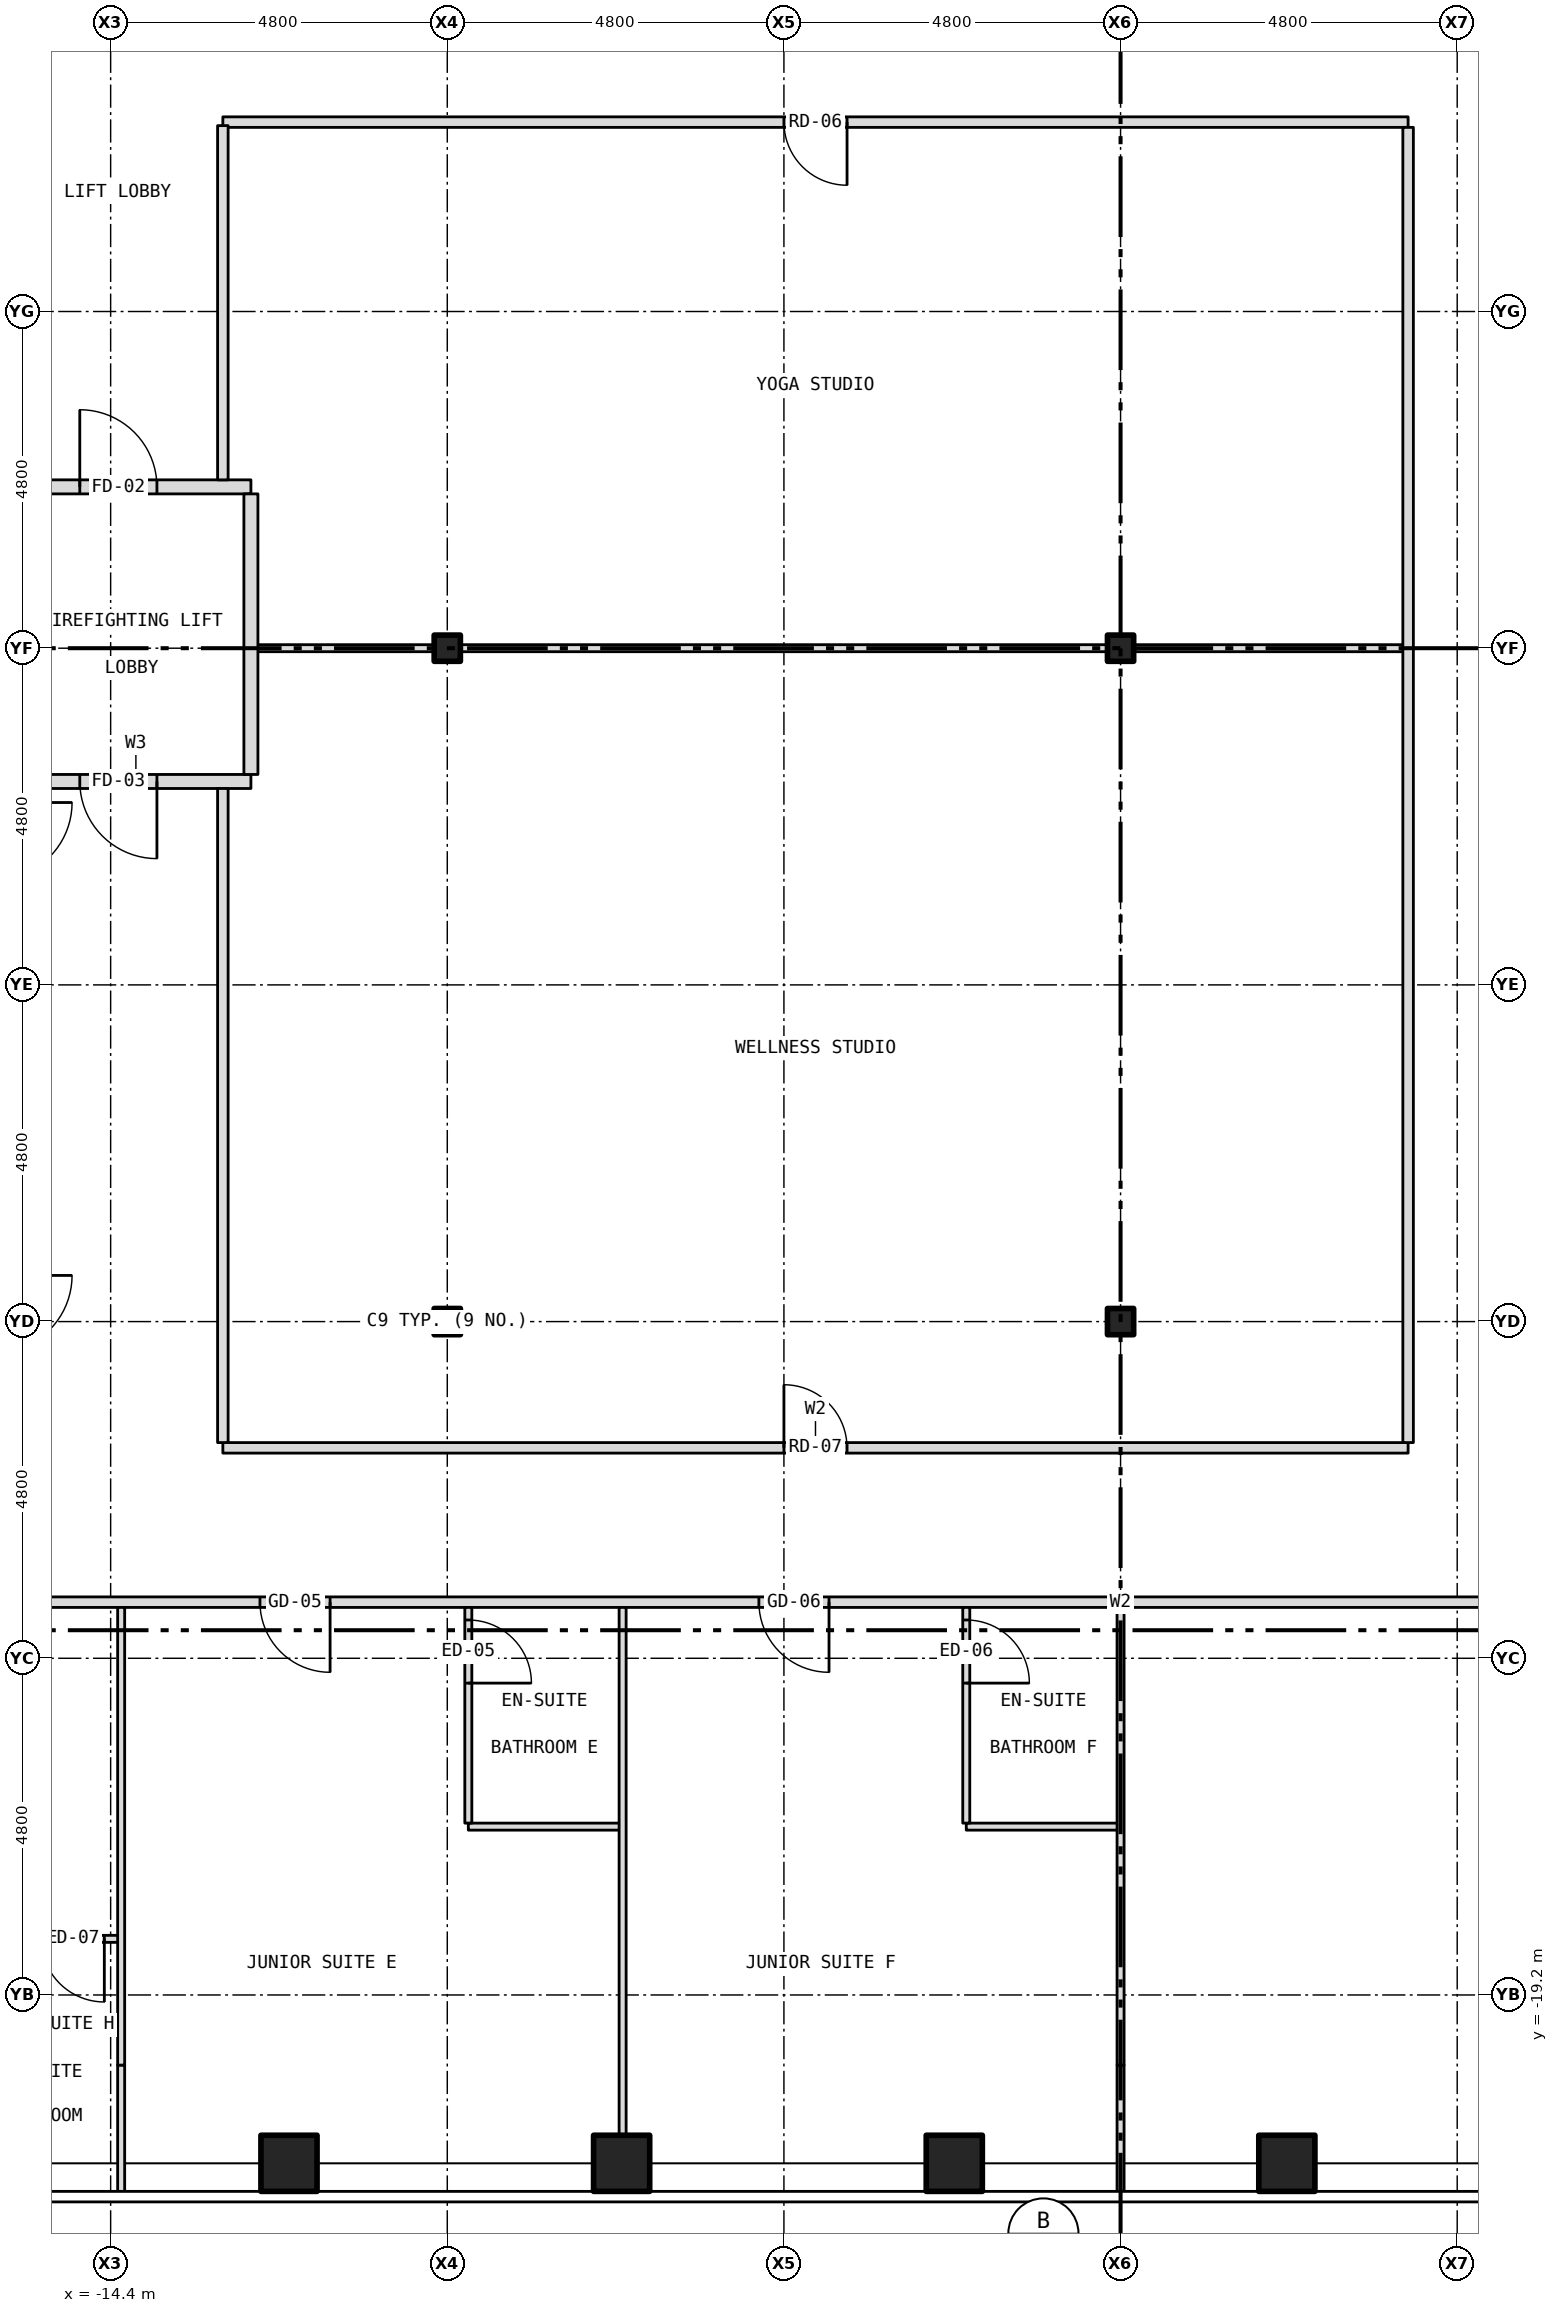
"""IFC4 building model, lengths in metres.
Left out: names, types, materials, properties, quantities, classifications, styles, units other than length and angle.
Written with IfcOpenShell. Run it as: python <this file> out.ifc"""

import sys

from ifc_helpers import new_model, si_unit, direction, frame, frame_2d, origin, origin_2d, place, context, subcontext, project, spatial, rectangle, hollow_rectangle, i_section, extrude, element, fill, save


model = new_model("IFC4")
c1 = context("Model", 3, precision=1e-05, world=origin(), true_north=direction((0.0, 1.0)))
c2 = subcontext(c1, "Body", "Model", "MODEL_VIEW")
j1 = project(units=[si_unit("LENGTHUNIT", "METRE"), si_unit("PLANEANGLEUNIT", "RADIAN")], contexts=[c1])
p1 = place(None, origin())
s1 = spatial("IfcSite", under=j1, at=p1, CompositionType="ELEMENT")
p2 = place(p1, origin())
s2 = spatial("IfcBuilding", under=s1, at=p2, CompositionType="ELEMENT")
p3 = place(p2, frame((0.0, 0.0, 183.0)))
s3 = spatial("IfcBuildingStorey", under=s2, at=p3, CompositionType="ELEMENT", Elevation=183.0)
for number, where, z_axis, x_axis in (
    (1, (-11.857, -21.6, -0.15), (0.0, 0.0, 1.0), (1.0, 0.0, 0.0)),
    (2, (-7.114, -21.6, -0.15), (0.0, 0.0, 1.0), (1.0, 0.0, 0.0)),
    (3, (-2.371, -21.6, -0.15), (0.0, 0.0, 1.0), (1.0, 0.0, 0.0)),
    (4, (2.371, -21.6, -0.15), (0.0, 0.0, 1.0), (1.0, 0.0, 0.0)),
):
    element("IfcColumn", number, at=place(p3, frame(where, z_axis=z_axis, x_axis=x_axis)), inside=s3, PredefinedType="COLUMN", context=c2, shape_type="SweptSolid", body=[
        extrude(hollow_rectangle(XDim=0.8, YDim=0.8, WallThickness=0.045, at=origin_2d()), origin(), (0.0, 0.0, 1.0), 3.35),
    ])
for number, where, z_axis, x_axis in (
    (5, (-9.6, -9.6, -0.15), (0.0, 0.0, 1.0), (1.0, 0.0, 0.0)),
    (6, (-9.6, 0.0, -0.15), (0.0, 0.0, 1.0), (1.0, 0.0, 0.0)),
    (7, (0.0, -9.6, -0.15), (0.0, 0.0, 1.0), (1.0, 0.0, 0.0)),
    (8, (0.0, 0.0, -0.15), (0.0, 0.0, 1.0), (1.0, 0.0, 0.0)),
):
    element("IfcColumn", number, at=place(p3, frame(where, z_axis=z_axis, x_axis=x_axis)), inside=s3, PredefinedType="COLUMN", context=c2, shape_type="SweptSolid", body=[
        extrude(i_section(OverallWidth=0.373, OverallDepth=0.373, WebThickness=0.016, FlangeThickness=0.026, at=origin_2d()), origin(), (0.0, 0.0, 1.0), 3.35),
    ])
p4 = place(p3, frame((-17.03, -18.4, 0.0), z_axis=(0.0, 0.0, 1.0), x_axis=(1.0, 0.0, 0.0)))
e9 = element("IfcWall", 9, at=p4, inside=s3, PredefinedType="PARTITIONING", context=c2, shape_type="SweptSolid", body=[
    extrude(rectangle(XDim=2.78, YDim=0.1, at=frame_2d((1.39, 0.0))), origin(), (0.0, 0.0, 1.0), 3.2),
])
p5 = place(p4, frame((1.64, 0.0, 0.0)))
e10 = element("IfcOpeningElement", 10, at=p5, cuts=e9, PredefinedType="OPENING", context=c2, shape_type="SweptSolid", body=[
    extrude(rectangle(XDim=0.9, YDim=2.1, at=frame_2d((0.45, 1.05))), frame((0.0, 0.062, 0.0), z_axis=(0.0, -1.0, 0.0), x_axis=(1.0, 0.0, 0.0)), (0.0, 0.0, 1.0), 0.124),
])
for number, where, z_axis, x_axis in (
    (11, (-9.3, -16.8, 0.0), (0.0, 0.0, 1.0), (1.0, 0.0, 0.0)),
    (12, (-2.2, -16.8, 0.0), (0.0, 0.0, 1.0), (1.0, 0.0, 0.0)),
):
    element("IfcWall", number, at=place(p3, frame(where, z_axis=z_axis, x_axis=x_axis)), inside=s3, PredefinedType="PARTITIONING", context=c2, shape_type="SweptSolid", body=[
        extrude(rectangle(XDim=2.2, YDim=0.1, at=frame_2d((1.1, 0.0))), origin(), (0.0, 0.0, 1.0), 3.2),
    ])
p6 = place(p3, frame((-15.8, -13.6, 0.0), z_axis=(0.0, 0.0, 1.0), x_axis=(1.0, 0.0, 0.0)))
e13 = element("IfcWall", 13, at=p6, inside=s3, PredefinedType="PARTITIONING", context=c2, shape_type="SweptSolid", body=[
    extrude(rectangle(XDim=31.6, YDim=0.15, at=frame_2d((15.8, 0.0))), origin(), (0.0, 0.0, 1.0), 3.2),
])
p7 = place(p6, frame((3.529, 0.0, 0.0)))
e14 = element("IfcOpeningElement", 14, at=p7, cuts=e13, PredefinedType="OPENING", context=c2, shape_type="SweptSolid", body=[
    extrude(rectangle(XDim=1.0, YDim=2.1, at=frame_2d((0.5, 1.05))), frame((0.0, 0.087, 0.0), z_axis=(0.0, -1.0, 0.0), x_axis=(1.0, 0.0, 0.0)), (0.0, 0.0, 1.0), 0.174),
])
p8 = place(p6, frame((10.643, 0.0, 0.0)))
e15 = element("IfcOpeningElement", 15, at=p8, cuts=e13, PredefinedType="OPENING", context=c2, shape_type="SweptSolid", body=[
    extrude(rectangle(XDim=1.0, YDim=2.1, at=frame_2d((0.5, 1.05))), frame((0.0, 0.087, 0.0), z_axis=(0.0, -1.0, 0.0), x_axis=(1.0, 0.0, 0.0)), (0.0, 0.0, 1.0), 0.174),
])
p9 = place(p6, frame((22.465, 0.0, 0.0)))
e16 = element("IfcOpeningElement", 16, at=p9, cuts=e13, PredefinedType="OPENING", context=c2, shape_type="SweptSolid", body=[
    extrude(rectangle(XDim=0.9, YDim=2.1, at=frame_2d((0.45, 1.05))), frame((0.0, 0.087, 0.0), z_axis=(0.0, -1.0, 0.0), x_axis=(1.0, 0.0, 0.0)), (0.0, 0.0, 1.0), 0.174),
])
p10 = place(p3, frame((-12.8, -11.4, 0.0), z_axis=(0.0, 0.0, 1.0), x_axis=(1.0, 0.0, 0.0)))
e17 = element("IfcWall", 17, at=p10, inside=s3, PredefinedType="PARTITIONING", context=c2, shape_type="SweptSolid", body=[
    extrude(rectangle(XDim=16.9, YDim=0.15, at=frame_2d((8.45, 0.0))), origin(), (0.0, 0.0, 1.0), 3.2),
])
p11 = place(p10, frame((8.0, 0.0, 0.0)))
e18 = element("IfcOpeningElement", 18, at=p11, cuts=e17, PredefinedType="OPENING", context=c2, shape_type="SweptSolid", body=[
    extrude(rectangle(XDim=0.9, YDim=2.1, at=frame_2d((0.45, 1.05))), frame((0.0, 0.087, 0.0), z_axis=(0.0, -1.0, 0.0), x_axis=(1.0, 0.0, 0.0)), (0.0, 0.0, 1.0), 0.174),
])
p12 = place(p3, frame((-15.68, -1.9, 0.0), z_axis=(0.0, 0.0, 1.0), x_axis=(1.0, 0.0, 0.0)))
e19 = element("IfcWall", 19, at=p12, inside=s3, PredefinedType="PARTITIONING", context=c2, shape_type="SweptSolid", body=[
    extrude(rectangle(XDim=3.28, YDim=0.2, at=frame_2d((1.64, 0.0))), origin(), (0.0, 0.0, 1.0), 3.2),
])
p13 = place(p12, frame((0.84, 0.0, 0.0)))
e20 = element("IfcOpeningElement", 20, at=p13, cuts=e19, PredefinedType="OPENING", context=c2, shape_type="SweptSolid", body=[
    extrude(rectangle(XDim=1.1, YDim=2.1, at=frame_2d((0.55, 1.05))), frame((0.0, 0.112, 0.0), z_axis=(0.0, -1.0, 0.0), x_axis=(1.0, 0.0, 0.0)), (0.0, 0.0, 1.0), 0.224),
])
p14 = place(p3, frame((-12.4, 0.0, 0.0), z_axis=(0.0, 0.0, 1.0), x_axis=(1.0, 0.0, 0.0)))
e21 = element("IfcWall", 21, at=p14, inside=s3, PredefinedType="PARTITIONING", context=c2, shape_type="SweptSolid", body=[
    extrude(rectangle(XDim=2.613, YDim=0.1, at=frame_2d((1.306, 0.0))), origin(), (0.0, 0.0, 1.0), 2.578),
])
p15 = place(p3, frame((-9.787, 0.0, 0.0), z_axis=(0.0, 0.0, 1.0), x_axis=(1.0, 0.0, 0.0)))
e22 = element("IfcWall", 22, at=p15, inside=s3, PredefinedType="PARTITIONING", context=c2, shape_type="SweptSolid", body=[
    extrude(rectangle(XDim=0.374, YDim=0.1, at=frame_2d((0.187, 0.0))), origin(), (0.0, 0.0, 1.0), 3.2),
])
p16 = place(p3, frame((-9.413, 0.0, 0.0), z_axis=(0.0, 0.0, 1.0), x_axis=(1.0, 0.0, 0.0)))
e23 = element("IfcWall", 23, at=p16, inside=s3, PredefinedType="PARTITIONING", context=c2, shape_type="SweptSolid", body=[
    extrude(rectangle(XDim=9.226, YDim=0.1, at=frame_2d((4.613, 0.0))), origin(), (0.0, 0.0, 1.0), 2.578),
])
p17 = place(p3, frame((-0.187, 0.0, 0.0), z_axis=(0.0, 0.0, 1.0), x_axis=(1.0, 0.0, 0.0)))
e24 = element("IfcWall", 24, at=p17, inside=s3, PredefinedType="PARTITIONING", context=c2, shape_type="SweptSolid", body=[
    extrude(rectangle(XDim=0.374, YDim=0.1, at=frame_2d((0.187, 0.0))), origin(), (0.0, 0.0, 1.0), 3.2),
])
p18 = place(p3, frame((0.187, 0.0, 0.0), z_axis=(0.0, 0.0, 1.0), x_axis=(1.0, 0.0, 0.0)))
e25 = element("IfcWall", 25, at=p18, inside=s3, PredefinedType="PARTITIONING", context=c2, shape_type="SweptSolid", body=[
    extrude(rectangle(XDim=3.913, YDim=0.1, at=frame_2d((1.957, 0.0))), origin(), (0.0, 0.0, 1.0), 2.578),
])
p19 = place(p3, frame((-15.68, 2.3, 0.0), z_axis=(0.0, 0.0, 1.0), x_axis=(1.0, 0.0, 0.0)))
e26 = element("IfcWall", 26, at=p19, inside=s3, PredefinedType="PARTITIONING", context=c2, shape_type="SweptSolid", body=[
    extrude(rectangle(XDim=3.28, YDim=0.2, at=frame_2d((1.64, 0.0))), origin(), (0.0, 0.0, 1.0), 3.2),
])
p20 = place(p19, frame((0.84, 0.0, 0.0)))
e27 = element("IfcOpeningElement", 27, at=p20, cuts=e26, PredefinedType="OPENING", context=c2, shape_type="SweptSolid", body=[
    extrude(rectangle(XDim=1.1, YDim=2.1, at=frame_2d((0.55, 1.05))), frame((0.0, 0.112, 0.0), z_axis=(0.0, -1.0, 0.0), x_axis=(1.0, 0.0, 0.0)), (0.0, 0.0, 1.0), 0.224),
])
p21 = place(p3, frame((-12.8, 7.5, 0.0), z_axis=(0.0, 0.0, 1.0), x_axis=(1.0, 0.0, 0.0)))
e28 = element("IfcWall", 28, at=p21, inside=s3, PredefinedType="PARTITIONING", context=c2, shape_type="SweptSolid", body=[
    extrude(rectangle(XDim=16.9, YDim=0.15, at=frame_2d((8.45, 0.0))), origin(), (0.0, 0.0, 1.0), 3.2),
])
p22 = place(p21, frame((8.0, 0.0, 0.0)))
e29 = element("IfcOpeningElement", 29, at=p22, cuts=e28, PredefinedType="OPENING", context=c2, shape_type="SweptSolid", body=[
    extrude(rectangle(XDim=0.9, YDim=2.1, at=frame_2d((0.45, 1.05))), frame((0.0, 0.087, 0.0), z_axis=(0.0, -1.0, 0.0), x_axis=(1.0, 0.0, 0.0)), (0.0, 0.0, 1.0), 0.174),
])
p23 = place(p3, frame((-14.25, -22.03, 0.0), z_axis=(0.0, 0.0, 1.0), x_axis=(0.0, 1.0, 0.0)))
e30 = element("IfcWall", 30, at=p23, inside=s3, PredefinedType="PARTITIONING", context=c2, shape_type="SweptSolid", body=[
    extrude(rectangle(XDim=1.831, YDim=0.1, at=frame_2d((0.915, 0.0))), origin(), (0.0, 0.0, 1.0), 3.2),
])
p24 = place(p3, frame((-14.25, -20.2, 0.0), z_axis=(0.0, 0.0, 1.0), x_axis=(0.0, 1.0, 0.0)))
e31 = element("IfcWall", 31, at=p24, inside=s3, PredefinedType="PARTITIONING", context=c2, shape_type="SweptSolid", body=[
    extrude(rectangle(XDim=6.525, YDim=0.1, at=frame_2d((3.262, 0.0))), origin(), (0.0, 0.0, 1.0), 2.667),
])
p25 = place(p3, frame((-12.8, -11.325, 0.0), z_axis=(0.0, 0.0, 1.0), x_axis=(0.0, 1.0, 0.0)))
e32 = element("IfcWall", 32, at=p25, inside=s3, PredefinedType="PARTITIONING", context=c2, shape_type="SweptSolid", body=[
    extrude(rectangle(XDim=9.325, YDim=0.15, at=frame_2d((4.663, 0.0))), origin(), (0.0, 0.0, 1.0), 3.2),
])
p26 = place(p3, frame((-12.8, 2.4, 0.0), z_axis=(0.0, 0.0, 1.0), x_axis=(0.0, 1.0, 0.0)))
e33 = element("IfcWall", 33, at=p26, inside=s3, PredefinedType="PARTITIONING", context=c2, shape_type="SweptSolid", body=[
    extrude(rectangle(XDim=5.05, YDim=0.15, at=frame_2d((2.525, 0.0))), origin(), (0.0, 0.0, 1.0), 3.2),
])
p27 = place(p3, frame((-12.4, -1.8, 0.0), z_axis=(0.0, 0.0, 1.0), x_axis=(0.0, 1.0, 0.0)))
e34 = element("IfcWall", 34, at=p27, inside=s3, PredefinedType="PARTITIONING", context=c2, shape_type="SweptSolid", body=[
    extrude(rectangle(XDim=4.0, YDim=0.2, at=frame_2d((2.0, 0.0))), origin(), (0.0, 0.0, 1.0), 3.2),
])
p28 = place(p3, frame((-9.3, -16.75, 0.0), z_axis=(0.0, 0.0, 1.0), x_axis=(0.0, 1.0, 0.0)))
e35 = element("IfcWall", 35, at=p28, inside=s3, PredefinedType="PARTITIONING", context=c2, shape_type="SweptSolid", body=[
    extrude(rectangle(XDim=3.075, YDim=0.1, at=frame_2d((1.538, 0.0))), origin(), (0.0, 0.0, 1.0), 3.2),
])
p29 = place(p28, frame((1.996, 0.0, 0.0)))
e36 = element("IfcOpeningElement", 36, at=p29, cuts=e35, PredefinedType="OPENING", context=c2, shape_type="SweptSolid", body=[
    extrude(rectangle(XDim=0.9, YDim=2.1, at=frame_2d((0.45, 1.05))), frame((0.0, 0.062, 0.0), z_axis=(0.0, -1.0, 0.0), x_axis=(1.0, 0.0, 0.0)), (0.0, 0.0, 1.0), 0.124),
])
p30 = place(p3, frame((-7.1, -21.48, 0.0), z_axis=(0.0, 0.0, 1.0), x_axis=(0.0, 1.0, 0.0)))
e37 = element("IfcWall", 37, at=p30, inside=s3, PredefinedType="PARTITIONING", context=c2, shape_type="SweptSolid", body=[
    extrude(rectangle(XDim=7.805, YDim=0.1, at=frame_2d((3.902, 0.0))), origin(), (0.0, 0.0, 1.0), 3.2),
])
p31 = place(p3, frame((-2.2, -16.75, 0.0), z_axis=(0.0, 0.0, 1.0), x_axis=(0.0, 1.0, 0.0)))
e38 = element("IfcWall", 38, at=p31, inside=s3, PredefinedType="PARTITIONING", context=c2, shape_type="SweptSolid", body=[
    extrude(rectangle(XDim=3.075, YDim=0.1, at=frame_2d((1.538, 0.0))), origin(), (0.0, 0.0, 1.0), 3.2),
])
p32 = place(p31, frame((1.996, 0.0, 0.0)))
e39 = element("IfcOpeningElement", 39, at=p32, cuts=e38, PredefinedType="OPENING", context=c2, shape_type="SweptSolid", body=[
    extrude(rectangle(XDim=0.9, YDim=2.1, at=frame_2d((0.45, 1.05))), frame((0.0, 0.062, 0.0), z_axis=(0.0, -1.0, 0.0), x_axis=(1.0, 0.0, 0.0)), (0.0, 0.0, 1.0), 0.124),
])
p33 = place(p3, frame((0.0, -22.03, 0.0), z_axis=(0.0, 0.0, 1.0), x_axis=(0.0, 1.0, 0.0)))
e40 = element("IfcWall", 40, at=p33, inside=s3, PredefinedType="PARTITIONING", context=c2, shape_type="SweptSolid", body=[
    extrude(rectangle(XDim=1.831, YDim=0.1, at=frame_2d((0.915, 0.0))), origin(), (0.0, 0.0, 1.0), 3.2),
])
p34 = place(p3, frame((0.0, -20.2, 0.0), z_axis=(0.0, 0.0, 1.0), x_axis=(0.0, 1.0, 0.0)))
e41 = element("IfcWall", 41, at=p34, inside=s3, PredefinedType="PARTITIONING", context=c2, shape_type="SweptSolid", body=[
    extrude(rectangle(XDim=6.525, YDim=0.1, at=frame_2d((3.262, 0.0))), origin(), (0.0, 0.0, 1.0), 2.578),
])
p35 = place(p3, frame((4.1, -11.325, 0.0), z_axis=(0.0, 0.0, 1.0), x_axis=(0.0, 1.0, 0.0)))
e42 = element("IfcWall", 42, at=p35, inside=s3, PredefinedType="PARTITIONING", context=c2, shape_type="SweptSolid", body=[
    extrude(rectangle(XDim=18.75, YDim=0.15, at=frame_2d((9.375, 0.0))), origin(), (0.0, 0.0, 1.0), 3.2),
])
p36 = place(p20, origin())
e43 = element("IfcDoor", 43, at=p36, inside=s3, OperationType="SINGLE_SWING_LEFT", PredefinedType="DOOR", context=c2, shape_type="SweptSolid", body=[
    extrude(rectangle(XDim=1.1, YDim=2.1, at=frame_2d((0.55, 1.05))), frame((0.0, 0.025, 0.0), z_axis=(0.0, -1.0, 0.0), x_axis=(1.0, 0.0, 0.0)), (0.0, 0.0, 1.0), 0.05),
])
fill(e27, e43)
p37 = place(p13, origin())
e44 = element("IfcDoor", 44, at=p37, inside=s3, OperationType="SINGLE_SWING_RIGHT", PredefinedType="DOOR", context=c2, shape_type="SweptSolid", body=[
    extrude(rectangle(XDim=1.1, YDim=2.1, at=frame_2d((0.55, 1.05))), frame((0.0, 0.025, 0.0), z_axis=(0.0, -1.0, 0.0), x_axis=(1.0, 0.0, 0.0)), (0.0, 0.0, 1.0), 0.05),
])
fill(e20, e44)
p38 = place(p7, origin())
e45 = element("IfcDoor", 45, at=p38, inside=s3, OperationType="SINGLE_SWING_RIGHT", PredefinedType="DOOR", context=c2, shape_type="SweptSolid", body=[
    extrude(rectangle(XDim=1.0, YDim=2.1, at=frame_2d((0.5, 1.05))), frame((0.0, 0.025, 0.0), z_axis=(0.0, -1.0, 0.0), x_axis=(1.0, 0.0, 0.0)), (0.0, 0.0, 1.0), 0.05),
])
fill(e14, e45)
p39 = place(p29, origin())
e46 = element("IfcDoor", 46, at=p39, inside=s3, OperationType="SINGLE_SWING_LEFT", PredefinedType="DOOR", context=c2, shape_type="SweptSolid", body=[
    extrude(rectangle(XDim=0.9, YDim=2.1, at=frame_2d((0.45, 1.05))), frame((0.0, 0.025, 0.0), z_axis=(0.0, -1.0, 0.0), x_axis=(1.0, 0.0, 0.0)), (0.0, 0.0, 1.0), 0.05),
])
fill(e36, e46)
p40 = place(p8, origin())
e47 = element("IfcDoor", 47, at=p40, inside=s3, OperationType="SINGLE_SWING_RIGHT", PredefinedType="DOOR", context=c2, shape_type="SweptSolid", body=[
    extrude(rectangle(XDim=1.0, YDim=2.1, at=frame_2d((0.5, 1.05))), frame((0.0, 0.025, 0.0), z_axis=(0.0, -1.0, 0.0), x_axis=(1.0, 0.0, 0.0)), (0.0, 0.0, 1.0), 0.05),
])
fill(e15, e47)
p41 = place(p32, origin())
e48 = element("IfcDoor", 48, at=p41, inside=s3, OperationType="SINGLE_SWING_LEFT", PredefinedType="DOOR", context=c2, shape_type="SweptSolid", body=[
    extrude(rectangle(XDim=0.9, YDim=2.1, at=frame_2d((0.45, 1.05))), frame((0.0, 0.025, 0.0), z_axis=(0.0, -1.0, 0.0), x_axis=(1.0, 0.0, 0.0)), (0.0, 0.0, 1.0), 0.05),
])
fill(e39, e48)
p42 = place(p5, origin())
e49 = element("IfcDoor", 49, at=p42, inside=s3, OperationType="SINGLE_SWING_RIGHT", PredefinedType="DOOR", context=c2, shape_type="SweptSolid", body=[
    extrude(rectangle(XDim=0.9, YDim=2.1, at=frame_2d((0.45, 1.05))), frame((0.0, 0.025, 0.0), z_axis=(0.0, -1.0, 0.0), x_axis=(1.0, 0.0, 0.0)), (0.0, 0.0, 1.0), 0.05),
])
fill(e10, e49)
p43 = place(p22, origin())
e50 = element("IfcDoor", 50, at=p43, inside=s3, OperationType="SINGLE_SWING_RIGHT", PredefinedType="DOOR", context=c2, shape_type="SweptSolid", body=[
    extrude(rectangle(XDim=0.9, YDim=2.1, at=frame_2d((0.45, 1.05))), frame((0.0, 0.025, 0.0), z_axis=(0.0, -1.0, 0.0), x_axis=(1.0, 0.0, 0.0)), (0.0, 0.0, 1.0), 0.05),
])
fill(e29, e50)
p44 = place(p11, origin())
e51 = element("IfcDoor", 51, at=p44, inside=s3, OperationType="SINGLE_SWING_LEFT", PredefinedType="DOOR", context=c2, shape_type="SweptSolid", body=[
    extrude(rectangle(XDim=0.9, YDim=2.1, at=frame_2d((0.45, 1.05))), frame((0.0, 0.025, 0.0), z_axis=(0.0, -1.0, 0.0), x_axis=(1.0, 0.0, 0.0)), (0.0, 0.0, 1.0), 0.05),
])
fill(e18, e51)
save(model, sys.argv[1])
